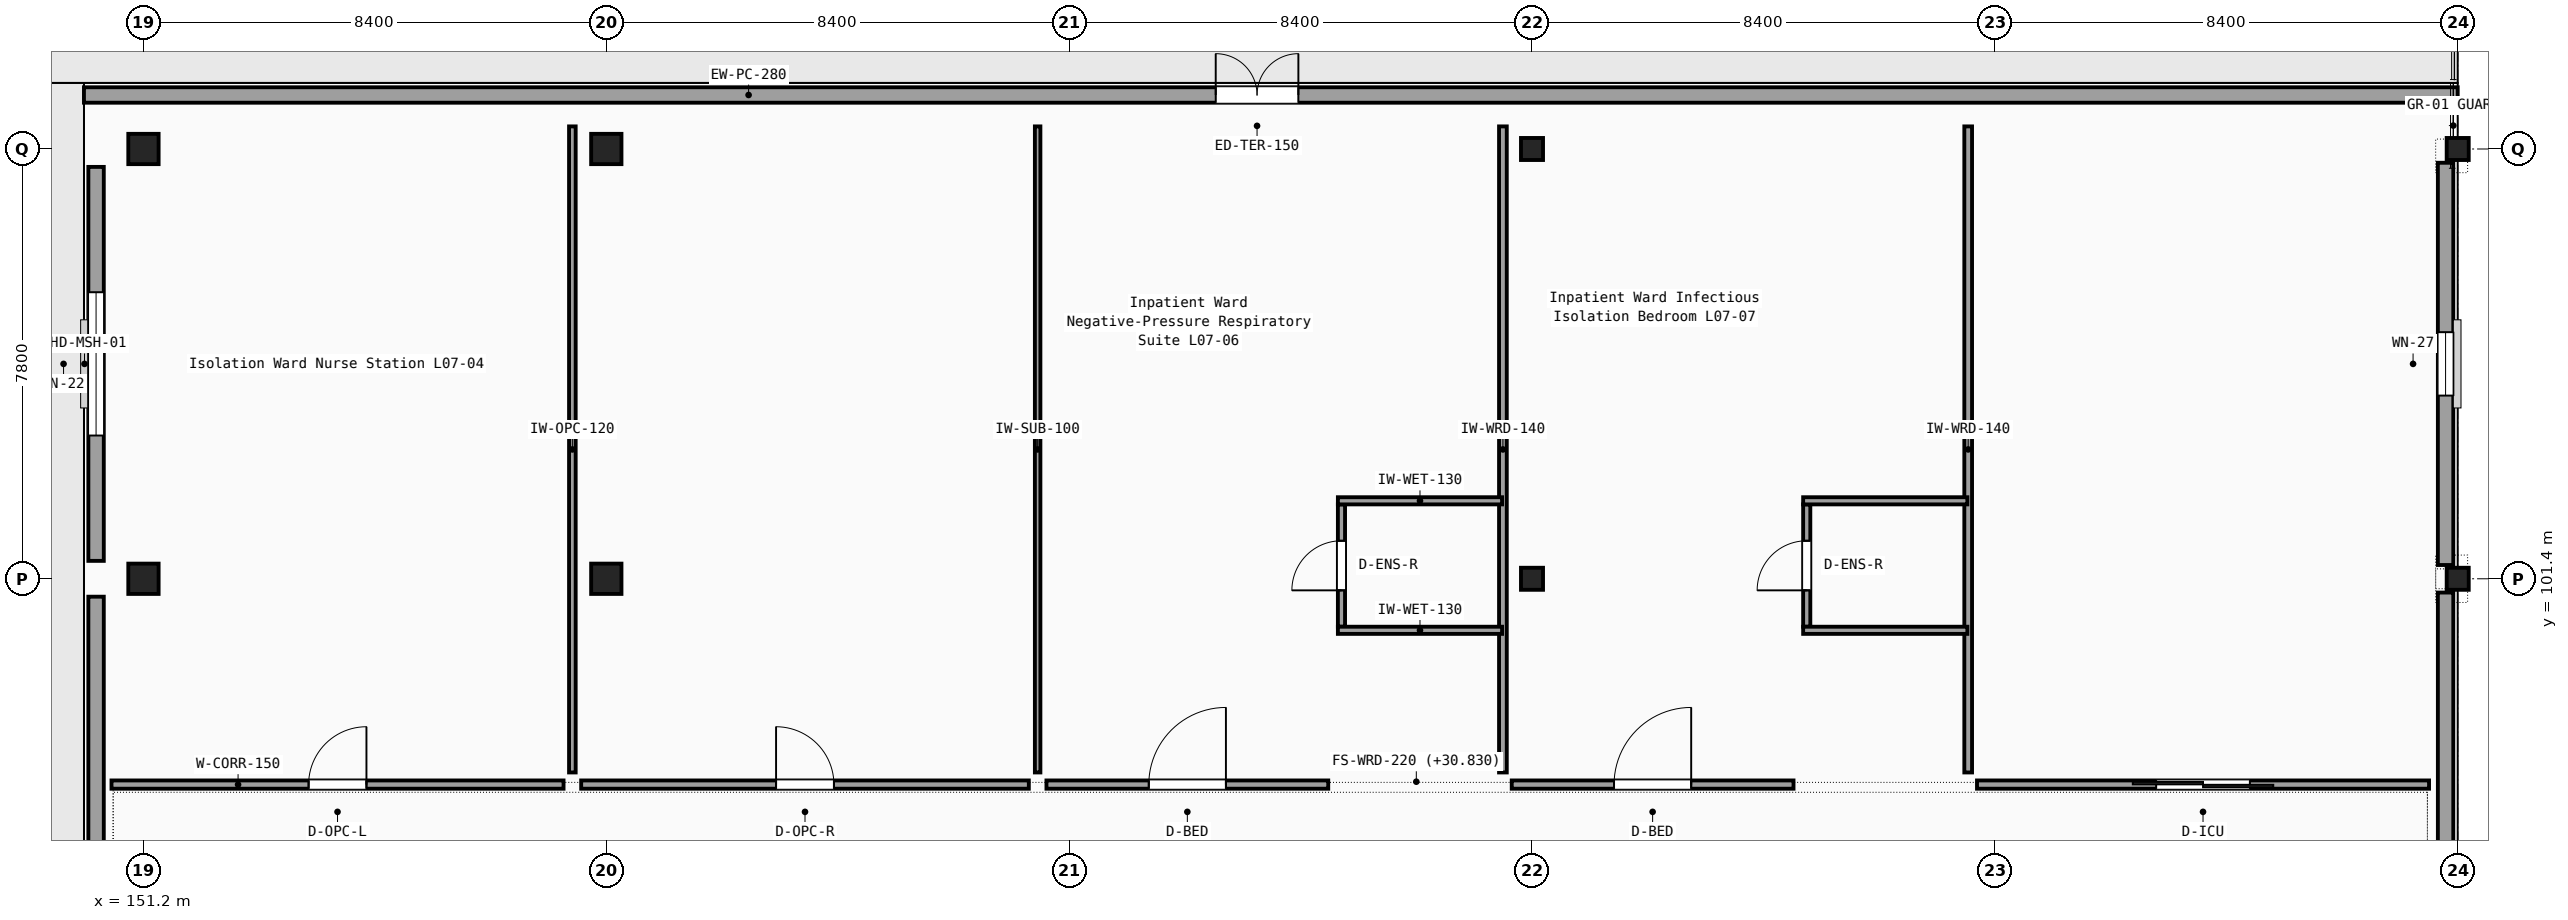
"""IFC4 building model, lengths in metres.
Left out: names, types, materials, properties, quantities, classifications, styles, units other than length and angle.
Written with IfcOpenShell. Run it as: python <this file> out.ifc"""

import sys

from ifc_helpers import new_model, si_unit, direction, frame, frame_2d, origin, origin_2d, place, context, subcontext, project, spatial, rectangle, i_section, extrude, element, fill, save


model = new_model("IFC4")
c1 = context("Model", 3, precision=1e-05, world=origin(), true_north=direction((0.0, 1.0)))
c2 = subcontext(c1, "Body", "Model", "MODEL_VIEW")
j1 = project(units=[si_unit("LENGTHUNIT", "METRE"), si_unit("PLANEANGLEUNIT", "RADIAN")], contexts=[c1])
p1 = place(None, origin())
s1 = spatial("IfcSite", under=j1, at=p1, CompositionType="ELEMENT")
p2 = place(p1, origin())
s2 = spatial("IfcBuilding", under=s1, at=p2, CompositionType="ELEMENT")
p3 = place(p2, frame((0.0, 0.0, 31.05)))
s3 = spatial("IfcBuildingStorey", under=s2, at=p3, CompositionType="ELEMENT", Elevation=31.05)
for number, where, z_axis, x_axis in (
    (1, (151.2, 101.4, 0.0), (0.0, 0.0, 1.0), (1.0, 0.0, 0.0)),
    (2, (151.2, 109.2, 0.0), (0.0, 0.0, 1.0), (1.0, 0.0, 0.0)),
    (3, (159.6, 101.4, 0.0), (0.0, 0.0, 1.0), (1.0, 0.0, 0.0)),
    (4, (159.6, 109.2, 0.0), (0.0, 0.0, 1.0), (1.0, 0.0, 0.0)),
):
    element("IfcColumn", number, at=place(p3, frame(where, z_axis=z_axis, x_axis=x_axis)), inside=s3, PredefinedType="COLUMN", context=c2, shape_type="SweptSolid", body=[
        extrude(rectangle(XDim=0.55, YDim=0.55, at=origin_2d()), origin(), (0.0, 0.0, 1.0), 4.05),
    ])
for number, where, z_axis, x_axis in (
    (5, (176.4, 101.4, 0.0), (0.0, 0.0, 1.0), (1.0, 0.0, 0.0)),
    (6, (176.4, 109.2, 0.0), (0.0, 0.0, 1.0), (1.0, 0.0, 0.0)),
    (7, (193.2, 101.4, 0.0), (0.0, 0.0, 1.0), (1.0, 0.0, 0.0)),
    (8, (193.2, 109.2, 0.0), (0.0, 0.0, 1.0), (1.0, 0.0, 0.0)),
):
    element("IfcColumn", number, at=place(p3, frame(where, z_axis=z_axis, x_axis=x_axis)), inside=s3, PredefinedType="COLUMN", context=c2, shape_type="SweptSolid", body=[
        extrude(i_section(OverallWidth=0.3, OverallDepth=0.4, WebThickness=0.013, FlangeThickness=0.024, FilletRadius=0.027, at=origin_2d()), origin(), (0.0, 0.0, 1.0), 4.05),
    ])
p4 = place(p3, frame((150.34, 93.925, 0.0), z_axis=(0.0, 0.0, 1.0), x_axis=(0.0, 1.0, 0.0)))
e9 = element("IfcWall", 9, at=p4, inside=s3, PredefinedType="SOLIDWALL", context=c2, shape_type="SweptSolid", body=[
    extrude(rectangle(XDim=7.15, YDim=0.28, at=frame_2d((3.575, 0.0))), origin(), (0.0, 0.0, 1.0), 3.77),
])
p5 = place(p3, frame((150.34, 101.725, 0.0), z_axis=(0.0, 0.0, 1.0), x_axis=(0.0, 1.0, 0.0)))
e10 = element("IfcWall", 10, at=p5, inside=s3, PredefinedType="SOLIDWALL", context=c2, shape_type="SweptSolid", body=[
    extrude(rectangle(XDim=7.15, YDim=0.28, at=frame_2d((3.575, 0.0))), origin(), (0.0, 0.0, 1.0), 3.77),
])
p6 = place(p5, frame((2.275, 0.0, 0.65)))
e11 = element("IfcOpeningElement", 11, at=p6, cuts=e10, PredefinedType="OPENING", context=c2, shape_type="SweptSolid", body=[
    extrude(rectangle(XDim=2.6, YDim=2.0, at=frame_2d((1.3, 1.0))), frame((0.0, 0.15, 0.0), z_axis=(0.0, -1.0, 0.0), x_axis=(1.0, 0.0, 0.0)), (0.0, 0.0, 1.0), 0.3),
])
p7 = place(p3, frame((150.12, 110.18, 0.0), z_axis=(0.0, 0.0, 1.0), x_axis=(1.0, 0.0, 0.0)))
e12 = element("IfcWall", 12, at=p7, inside=s3, PredefinedType="SOLIDWALL", context=c2, shape_type="SweptSolid", body=[
    extrude(rectangle(XDim=43.08, YDim=0.28, at=frame_2d((21.54, 0.0))), origin(), (0.0, 0.0, 1.0), 3.77),
])
p8 = place(p7, frame((20.54, 0.0, 0.0)))
e13 = element("IfcOpeningElement", 13, at=p8, cuts=e12, PredefinedType="OPENING", context=c2, shape_type="SweptSolid", body=[
    extrude(rectangle(XDim=1.5, YDim=2.2, at=frame_2d((0.75, 1.1))), frame((0.0, 0.15, 0.0), z_axis=(0.0, -1.0, 0.0), x_axis=(1.0, 0.0, 0.0)), (0.0, 0.0, 1.0), 0.3),
])
p9 = place(p3, frame((192.98, 93.85, 0.0), z_axis=(0.0, 0.0, 1.0), x_axis=(0.0, 1.0, 0.0)))
e14 = element("IfcWall", 14, at=p9, inside=s3, PredefinedType="SOLIDWALL", context=c2, shape_type="SweptSolid", body=[
    extrude(rectangle(XDim=7.3, YDim=0.28, at=frame_2d((3.65, 0.0))), origin(), (0.0, 0.0, 1.0), 3.44),
])
p10 = place(p3, frame((192.98, 101.65, 0.0), z_axis=(0.0, 0.0, 1.0), x_axis=(0.0, 1.0, 0.0)))
e15 = element("IfcWall", 15, at=p10, inside=s3, PredefinedType="SOLIDWALL", context=c2, shape_type="SweptSolid", body=[
    extrude(rectangle(XDim=7.3, YDim=0.28, at=frame_2d((3.65, 0.0))), origin(), (0.0, 0.0, 1.0), 3.44),
])
p11 = place(p10, frame((3.075, 0.0, 0.7)))
e16 = element("IfcOpeningElement", 16, at=p11, cuts=e15, PredefinedType="OPENING", context=c2, shape_type="SweptSolid", body=[
    extrude(rectangle(XDim=1.15, YDim=1.95, at=frame_2d((0.575, 0.975))), frame((0.0, 0.15, 0.0), z_axis=(0.0, -1.0, 0.0), x_axis=(1.0, 0.0, 0.0)), (0.0, 0.0, 1.0), 0.3),
])
p12 = place(p3, frame((150.62, 97.665, 0.0), z_axis=(0.0, 0.0, 1.0), x_axis=(1.0, 0.0, 0.0)))
e17 = element("IfcWall", 17, at=p12, inside=s3, PredefinedType="PARTITIONING", context=c2, shape_type="SweptSolid", body=[
    extrude(rectangle(XDim=8.204, YDim=0.15, at=frame_2d((4.102, 0.0))), origin(), (0.0, 0.0, 1.0), 3.77),
])
p13 = place(p12, frame((3.577, 0.0, 0.0)))
e18 = element("IfcOpeningElement", 18, at=p13, cuts=e17, PredefinedType="OPENING", context=c2, shape_type="SweptSolid", body=[
    extrude(rectangle(XDim=1.05, YDim=2.15, at=frame_2d((0.525, 1.075))), frame((0.0, 0.085, 0.0), z_axis=(0.0, -1.0, 0.0), x_axis=(1.0, 0.0, 0.0)), (0.0, 0.0, 1.0), 0.17),
])
p14 = place(p3, frame((158.984, 97.885, 0.0), z_axis=(0.0, 0.0, 1.0), x_axis=(0.0, 1.0, 0.0)))
e19 = element("IfcWall", 19, at=p14, inside=s3, PredefinedType="PARTITIONING", context=c2, shape_type="SweptSolid", body=[
    extrude(rectangle(XDim=11.725, YDim=0.12, at=frame_2d((5.863, 0.0))), origin(), (0.0, 0.0, 1.0), 3.44),
])
p15 = place(p3, frame((159.144, 97.665, 0.0), z_axis=(0.0, 0.0, 1.0), x_axis=(1.0, 0.0, 0.0)))
e20 = element("IfcWall", 20, at=p15, inside=s3, PredefinedType="PARTITIONING", context=c2, shape_type="SweptSolid", body=[
    extrude(rectangle(XDim=8.124, YDim=0.15, at=frame_2d((4.062, 0.0))), origin(), (0.0, 0.0, 1.0), 3.77),
])
p16 = place(p15, frame((3.537, 0.0, 0.0)))
e21 = element("IfcOpeningElement", 21, at=p16, cuts=e20, PredefinedType="OPENING", context=c2, shape_type="SweptSolid", body=[
    extrude(rectangle(XDim=1.05, YDim=2.15, at=frame_2d((0.525, 1.075))), frame((0.0, 0.085, 0.0), z_axis=(0.0, -1.0, 0.0), x_axis=(1.0, 0.0, 0.0)), (0.0, 0.0, 1.0), 0.17),
])
p17 = place(p3, frame((167.428, 97.885, 0.0), z_axis=(0.0, 0.0, 1.0), x_axis=(0.0, 1.0, 0.0)))
e22 = element("IfcWall", 22, at=p17, inside=s3, PredefinedType="PARTITIONING", context=c2, shape_type="SweptSolid", body=[
    extrude(rectangle(XDim=11.725, YDim=0.1, at=frame_2d((5.863, 0.0))), origin(), (0.0, 0.0, 1.0), 3.44),
])
p18 = place(p3, frame((167.588, 97.665, 0.0), z_axis=(0.0, 0.0, 1.0), x_axis=(1.0, 0.0, 0.0)))
e23 = element("IfcWall", 23, at=p18, inside=s3, PredefinedType="PARTITIONING", context=c2, shape_type="SweptSolid", body=[
    extrude(rectangle(XDim=5.114, YDim=0.15, at=frame_2d((2.557, 0.0))), origin(), (0.0, 0.0, 1.0), 3.77),
])
p19 = place(p18, frame((1.857, 0.0, 0.0)))
e24 = element("IfcOpeningElement", 24, at=p19, cuts=e23, PredefinedType="OPENING", context=c2, shape_type="SweptSolid", body=[
    extrude(rectangle(XDim=1.4, YDim=2.2, at=frame_2d((0.7, 1.1))), frame((0.0, 0.085, 0.0), z_axis=(0.0, -1.0, 0.0), x_axis=(1.0, 0.0, 0.0)), (0.0, 0.0, 1.0), 0.17),
])
p20 = place(p3, frame((175.872, 97.885, 0.0), z_axis=(0.0, 0.0, 1.0), x_axis=(0.0, 1.0, 0.0)))
e25 = element("IfcWall", 25, at=p20, inside=s3, PredefinedType="PARTITIONING", context=c2, shape_type="SweptSolid", body=[
    extrude(rectangle(XDim=11.725, YDim=0.14, at=frame_2d((5.863, 0.0))), origin(), (0.0, 0.0, 1.0), 3.44),
])
p21 = place(p3, frame((172.942, 100.53, 0.0), z_axis=(0.0, 0.0, 1.0), x_axis=(0.0, 1.0, 0.0)))
e26 = element("IfcWall", 26, at=p21, inside=s3, PredefinedType="PARTITIONING", context=c2, shape_type="SweptSolid", body=[
    extrude(rectangle(XDim=2.22, YDim=0.13, at=frame_2d((1.11, 0.0))), origin(), (0.0, 0.0, 1.0), 3.44),
])
p22 = place(p21, frame((0.66, 0.0, 0.0)))
e27 = element("IfcOpeningElement", 27, at=p22, cuts=e26, PredefinedType="OPENING", context=c2, shape_type="SweptSolid", body=[
    extrude(rectangle(XDim=0.9, YDim=2.1, at=frame_2d((0.45, 1.05))), frame((0.0, 0.075, 0.0), z_axis=(0.0, -1.0, 0.0), x_axis=(1.0, 0.0, 0.0)), (0.0, 0.0, 1.0), 0.15),
])
for number, where, z_axis, x_axis in (
    (28, (172.877, 100.465, 0.0), (0.0, 0.0, 1.0), (1.0, 0.0, 0.0)),
    (29, (172.877, 102.815, 0.0), (0.0, 0.0, 1.0), (1.0, 0.0, 0.0)),
):
    element("IfcWall", number, at=place(p3, frame(where, z_axis=z_axis, x_axis=x_axis)), inside=s3, PredefinedType="PARTITIONING", context=c2, shape_type="SweptSolid", body=[
        extrude(rectangle(XDim=2.98, YDim=0.13, at=frame_2d((1.49, 0.0))), origin(), (0.0, 0.0, 1.0), 3.77),
    ])
p23 = place(p3, frame((176.032, 97.665, 0.0), z_axis=(0.0, 0.0, 1.0), x_axis=(1.0, 0.0, 0.0)))
e30 = element("IfcWall", 30, at=p23, inside=s3, PredefinedType="PARTITIONING", context=c2, shape_type="SweptSolid", body=[
    extrude(rectangle(XDim=5.114, YDim=0.15, at=frame_2d((2.557, 0.0))), origin(), (0.0, 0.0, 1.0), 3.77),
])
p24 = place(p23, frame((1.857, 0.0, 0.0)))
e31 = element("IfcOpeningElement", 31, at=p24, cuts=e30, PredefinedType="OPENING", context=c2, shape_type="SweptSolid", body=[
    extrude(rectangle(XDim=1.4, YDim=2.2, at=frame_2d((0.7, 1.1))), frame((0.0, 0.085, 0.0), z_axis=(0.0, -1.0, 0.0), x_axis=(1.0, 0.0, 0.0)), (0.0, 0.0, 1.0), 0.17),
])
p25 = place(p3, frame((184.316, 97.885, 0.0), z_axis=(0.0, 0.0, 1.0), x_axis=(0.0, 1.0, 0.0)))
e32 = element("IfcWall", 32, at=p25, inside=s3, PredefinedType="PARTITIONING", context=c2, shape_type="SweptSolid", body=[
    extrude(rectangle(XDim=11.725, YDim=0.14, at=frame_2d((5.863, 0.0))), origin(), (0.0, 0.0, 1.0), 3.44),
])
p26 = place(p3, frame((181.386, 100.53, 0.0), z_axis=(0.0, 0.0, 1.0), x_axis=(0.0, 1.0, 0.0)))
e33 = element("IfcWall", 33, at=p26, inside=s3, PredefinedType="PARTITIONING", context=c2, shape_type="SweptSolid", body=[
    extrude(rectangle(XDim=2.22, YDim=0.13, at=frame_2d((1.11, 0.0))), origin(), (0.0, 0.0, 1.0), 3.44),
])
p27 = place(p26, frame((0.66, 0.0, 0.0)))
e34 = element("IfcOpeningElement", 34, at=p27, cuts=e33, PredefinedType="OPENING", context=c2, shape_type="SweptSolid", body=[
    extrude(rectangle(XDim=0.9, YDim=2.1, at=frame_2d((0.45, 1.05))), frame((0.0, 0.075, 0.0), z_axis=(0.0, -1.0, 0.0), x_axis=(1.0, 0.0, 0.0)), (0.0, 0.0, 1.0), 0.15),
])
for number, where, z_axis, x_axis in (
    (35, (181.321, 100.465, 0.0), (0.0, 0.0, 1.0), (1.0, 0.0, 0.0)),
    (36, (181.321, 102.815, 0.0), (0.0, 0.0, 1.0), (1.0, 0.0, 0.0)),
):
    element("IfcWall", number, at=place(p3, frame(where, z_axis=z_axis, x_axis=x_axis)), inside=s3, PredefinedType="PARTITIONING", context=c2, shape_type="SweptSolid", body=[
        extrude(rectangle(XDim=2.98, YDim=0.13, at=frame_2d((1.49, 0.0))), origin(), (0.0, 0.0, 1.0), 3.77),
    ])
p28 = place(p3, frame((184.476, 97.665, 0.0), z_axis=(0.0, 0.0, 1.0), x_axis=(1.0, 0.0, 0.0)))
e37 = element("IfcWall", 37, at=p28, inside=s3, PredefinedType="PARTITIONING", context=c2, shape_type="SweptSolid", body=[
    extrude(rectangle(XDim=8.204, YDim=0.15, at=frame_2d((4.102, 0.0))), origin(), (0.0, 0.0, 1.0), 3.77),
])
p29 = place(p28, frame((3.252, 0.0, 0.0)))
e38 = element("IfcOpeningElement", 38, at=p29, cuts=e37, PredefinedType="OPENING", context=c2, shape_type="SweptSolid", body=[
    extrude(rectangle(XDim=1.7, YDim=2.3, at=frame_2d((0.85, 1.15))), frame((0.0, 0.085, 0.0), z_axis=(0.0, -1.0, 0.0), x_axis=(1.0, 0.0, 0.0)), (0.0, 0.0, 1.0), 0.17),
])
p30 = place(p6, origin())
e39 = element("IfcWindow", 39, at=p30, inside=s3, PartitioningType="SINGLE_PANEL", PredefinedType="WINDOW", context=c2, shape_type="SweptSolid", body=[
    extrude(rectangle(XDim=2.6, YDim=2.0, at=frame_2d((1.3, 1.0))), frame((0.0, 0.03, 0.0), z_axis=(0.0, -1.0, 0.0), x_axis=(1.0, 0.0, 0.0)), (0.0, 0.0, 1.0), 0.06),
])
fill(e11, e39)
p31 = place(p8, origin())
e40 = element("IfcDoor", 40, at=p31, inside=s3, OperationType="DOUBLE_DOOR_SINGLE_SWING", PredefinedType="DOOR", context=c2, shape_type="SweptSolid", body=[
    extrude(rectangle(XDim=1.5, YDim=2.2, at=frame_2d((0.75, 1.1))), frame((0.0, 0.025, 0.0), z_axis=(0.0, -1.0, 0.0), x_axis=(1.0, 0.0, 0.0)), (0.0, 0.0, 1.0), 0.05),
])
fill(e13, e40)
p32 = place(p11, origin())
e41 = element("IfcWindow", 41, at=p32, inside=s3, PartitioningType="SINGLE_PANEL", PredefinedType="WINDOW", context=c2, shape_type="SweptSolid", body=[
    extrude(rectangle(XDim=1.15, YDim=1.95, at=frame_2d((0.575, 0.975))), frame((0.0, 0.03, 0.0), z_axis=(0.0, -1.0, 0.0), x_axis=(1.0, 0.0, 0.0)), (0.0, 0.0, 1.0), 0.06),
])
fill(e16, e41)
p33 = place(p13, origin())
e42 = element("IfcDoor", 42, at=p33, inside=s3, OperationType="SINGLE_SWING_RIGHT", PredefinedType="DOOR", context=c2, shape_type="SweptSolid", body=[
    extrude(rectangle(XDim=1.05, YDim=2.15, at=frame_2d((0.525, 1.075))), frame((0.0, 0.025, 0.0), z_axis=(0.0, -1.0, 0.0), x_axis=(1.0, 0.0, 0.0)), (0.0, 0.0, 1.0), 0.05),
])
fill(e18, e42)
p34 = place(p16, origin())
e43 = element("IfcDoor", 43, at=p34, inside=s3, OperationType="SINGLE_SWING_LEFT", PredefinedType="DOOR", context=c2, shape_type="SweptSolid", body=[
    extrude(rectangle(XDim=1.05, YDim=2.15, at=frame_2d((0.525, 1.075))), frame((0.0, 0.025, 0.0), z_axis=(0.0, -1.0, 0.0), x_axis=(1.0, 0.0, 0.0)), (0.0, 0.0, 1.0), 0.05),
])
fill(e21, e43)
p35 = place(p19, origin())
e44 = element("IfcDoor", 44, at=p35, inside=s3, OperationType="SINGLE_SWING_RIGHT", PredefinedType="DOOR", context=c2, shape_type="SweptSolid", body=[
    extrude(rectangle(XDim=1.4, YDim=2.2, at=frame_2d((0.7, 1.1))), frame((0.0, 0.025, 0.0), z_axis=(0.0, -1.0, 0.0), x_axis=(1.0, 0.0, 0.0)), (0.0, 0.0, 1.0), 0.05),
])
fill(e24, e44)
p36 = place(p22, origin())
e45 = element("IfcDoor", 45, at=p36, inside=s3, OperationType="SINGLE_SWING_LEFT", PredefinedType="DOOR", context=c2, shape_type="SweptSolid", body=[
    extrude(rectangle(XDim=0.9, YDim=2.1, at=frame_2d((0.45, 1.05))), frame((0.0, 0.025, 0.0), z_axis=(0.0, -1.0, 0.0), x_axis=(1.0, 0.0, 0.0)), (0.0, 0.0, 1.0), 0.05),
])
fill(e27, e45)
p37 = place(p24, origin())
e46 = element("IfcDoor", 46, at=p37, inside=s3, OperationType="SINGLE_SWING_RIGHT", PredefinedType="DOOR", context=c2, shape_type="SweptSolid", body=[
    extrude(rectangle(XDim=1.4, YDim=2.2, at=frame_2d((0.7, 1.1))), frame((0.0, 0.025, 0.0), z_axis=(0.0, -1.0, 0.0), x_axis=(1.0, 0.0, 0.0)), (0.0, 0.0, 1.0), 0.05),
])
fill(e31, e46)
p38 = place(p27, origin())
e47 = element("IfcDoor", 47, at=p38, inside=s3, OperationType="SINGLE_SWING_LEFT", PredefinedType="DOOR", context=c2, shape_type="SweptSolid", body=[
    extrude(rectangle(XDim=0.9, YDim=2.1, at=frame_2d((0.45, 1.05))), frame((0.0, 0.025, 0.0), z_axis=(0.0, -1.0, 0.0), x_axis=(1.0, 0.0, 0.0)), (0.0, 0.0, 1.0), 0.05),
])
fill(e34, e47)
p39 = place(p29, origin())
e48 = element("IfcDoor", 48, at=p39, inside=s3, OperationType="DOUBLE_DOOR_SLIDING", PredefinedType="DOOR", context=c2, shape_type="SweptSolid", body=[
    extrude(rectangle(XDim=1.7, YDim=2.3, at=frame_2d((0.85, 1.15))), frame((0.0, 0.025, 0.0), z_axis=(0.0, -1.0, 0.0), x_axis=(1.0, 0.0, 0.0)), (0.0, 0.0, 1.0), 0.05),
])
fill(e38, e48)
save(model, sys.argv[1])
